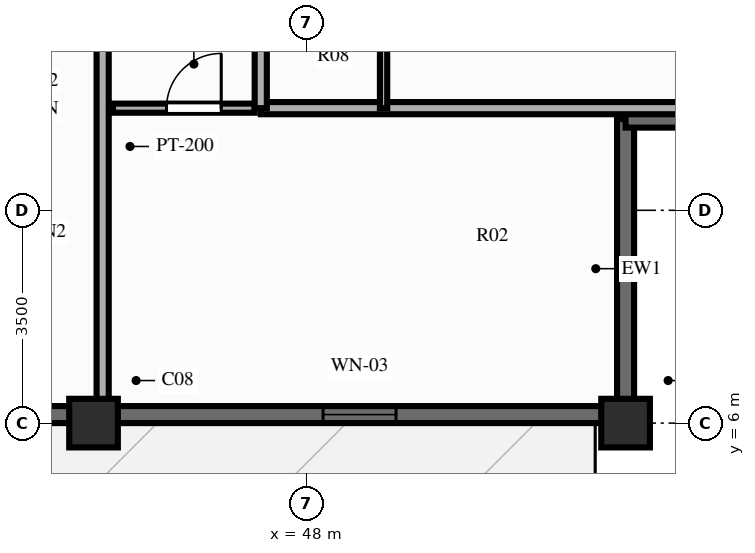
"""IFC4 building model, lengths in metres.
Left out: names, types, materials, properties, quantities, classifications, styles, units other than length and angle.
Written with IfcOpenShell. Run it as: python <this file> out.ifc"""

import sys

from ifc_helpers import new_model, si_unit, direction, frame, frame_2d, origin, origin_2d, place, context, subcontext, project, spatial, rectangle, extrude, source, transform, mapped, element, fill, save


model = new_model("IFC4")
c1 = context("Model", 3, precision=1e-05, world=origin(), true_north=direction((0.0, 1.0)))
c2 = subcontext(c1, "Body", "Model", "MODEL_VIEW")
j1 = project(units=[si_unit("LENGTHUNIT", "METRE"), si_unit("PLANEANGLEUNIT", "RADIAN")], contexts=[c1])
p1 = place(None, origin())
s1 = spatial("IfcSite", under=j1, at=p1, CompositionType="ELEMENT")
p2 = place(p1, origin())
s2 = spatial("IfcBuilding", under=s1, at=p2, CompositionType="ELEMENT")
p3 = place(p2, frame((0.0, 0.0, 179.8)))
s3 = spatial("IfcBuildingStorey", under=s2, at=p3, CompositionType="ELEMENT", Elevation=179.8)
m1 = source(origin(), c2, "Body", "SweptSolid", [
    extrude(rectangle(XDim=0.8, YDim=0.8, at=origin_2d()), origin(), (0.0, 0.0, 1.0), 3.0),
])
for number, where, z_axis, x_axis in (
    (1, (44.5, 6.0, 0.0), (0.0, 0.0, 1.0), (1.0, 0.0, 0.0)),
    (2, (53.25, 6.0, 0.0), (0.0, 0.0, 1.0), (1.0, 0.0, 0.0)),
):
    element("IfcColumn", number, at=place(p3, frame(where, z_axis=z_axis, x_axis=x_axis)), inside=s3, PredefinedType="COLUMN", context=c2, shape_type="MappedRepresentation", body=[
        mapped(m1, transform((0.0, 0.0, 0.0), scale=1.0)),
    ])
p4 = place(p3, frame((22.75, 6.14, 0.0), z_axis=(0.0, 0.0, 1.0), x_axis=(1.0, 0.0, 0.0)))
e3 = element("IfcWall", 3, at=p4, inside=s3, PredefinedType="SOLIDWALL", context=c2, shape_type="SweptSolid", body=[
    extrude(rectangle(XDim=30.5, YDim=0.28, at=frame_2d((15.25, 0.0))), origin(), (0.0, 0.0, 1.0), 2.28),
])
p5 = place(p4, frame((4.925, 0.0, 0.0), z_axis=(0.0, 0.0, 1.0), x_axis=(-1.0, 0.0, 0.0)))
e4 = element("IfcOpeningElement", 4, at=p5, cuts=e3, PredefinedType="OPENING", context=c2, shape_type="SweptSolid", body=[
    extrude(rectangle(XDim=1.1, YDim=2.15, at=frame_2d((0.55, 1.075))), frame((0.0, 0.152, 0.0), z_axis=(0.0, -1.0, 0.0), x_axis=(1.0, 0.0, 0.0)), (0.0, 0.0, 1.0), 0.304),
])
p6 = place(p4, frame((9.42, 0.0, 0.25)))
e5 = element("IfcOpeningElement", 5, at=p6, cuts=e3, PredefinedType="OPENING", context=c2, shape_type="SweptSolid", body=[
    extrude(rectangle(XDim=0.95, YDim=1.5, at=frame_2d((0.475, 0.75))), frame((0.0, 0.152, 0.0), z_axis=(0.0, -1.0, 0.0), x_axis=(1.0, 0.0, 0.0)), (0.0, 0.0, 1.0), 0.304),
])
p7 = place(p4, frame((11.244, 0.0, 0.25)))
e6 = element("IfcOpeningElement", 6, at=p7, cuts=e3, PredefinedType="OPENING", context=c2, shape_type="SweptSolid", body=[
    extrude(rectangle(XDim=1.2, YDim=1.5, at=frame_2d((0.6, 0.75))), frame((0.0, 0.152, 0.0), z_axis=(0.0, -1.0, 0.0), x_axis=(1.0, 0.0, 0.0)), (0.0, 0.0, 1.0), 0.304),
])
p8 = place(p4, frame((13.602, 0.0, 0.25)))
e7 = element("IfcOpeningElement", 7, at=p8, cuts=e3, PredefinedType="OPENING", context=c2, shape_type="SweptSolid", body=[
    extrude(rectangle(XDim=1.2, YDim=1.5, at=frame_2d((0.6, 0.75))), frame((0.0, 0.152, 0.0), z_axis=(0.0, -1.0, 0.0), x_axis=(1.0, 0.0, 0.0)), (0.0, 0.0, 1.0), 0.304),
])
p9 = place(p4, frame((16.683, 0.0, 0.25)))
e8 = element("IfcOpeningElement", 8, at=p9, cuts=e3, PredefinedType="OPENING", context=c2, shape_type="SweptSolid", body=[
    extrude(rectangle(XDim=1.2, YDim=1.5, at=frame_2d((0.6, 0.75))), frame((0.0, 0.152, 0.0), z_axis=(0.0, -1.0, 0.0), x_axis=(1.0, 0.0, 0.0)), (0.0, 0.0, 1.0), 0.304),
])
p10 = place(p4, frame((19.68, 0.0, 0.25)))
e9 = element("IfcOpeningElement", 9, at=p10, cuts=e3, PredefinedType="OPENING", context=c2, shape_type="SweptSolid", body=[
    extrude(rectangle(XDim=1.2, YDim=1.5, at=frame_2d((0.6, 0.75))), frame((0.0, 0.152, 0.0), z_axis=(0.0, -1.0, 0.0), x_axis=(1.0, 0.0, 0.0)), (0.0, 0.0, 1.0), 0.304),
])
p11 = place(p4, frame((25.525, 0.0, 0.25)))
e10 = element("IfcOpeningElement", 10, at=p11, cuts=e3, PredefinedType="OPENING", context=c2, shape_type="SweptSolid", body=[
    extrude(rectangle(XDim=1.2, YDim=1.5, at=frame_2d((0.6, 0.75))), frame((0.0, 0.152, 0.0), z_axis=(0.0, -1.0, 0.0), x_axis=(1.0, 0.0, 0.0)), (0.0, 0.0, 1.0), 0.304),
])
for number, where, z_axis, x_axis in (
    (11, (53.25, 6.08, 0.0), (0.0, 0.0, 1.0), (0.0, 1.0, 0.0)),
    (12, (53.25, 11.0, 0.0), (0.0, 0.0, 1.0), (1.0, 0.0, 0.0)),
):
    element("IfcWall", number, at=place(p3, frame(where, z_axis=z_axis, x_axis=x_axis)), inside=s3, PredefinedType="SOLIDWALL", context=c2, shape_type="SweptSolid", body=[
        extrude(rectangle(XDim=4.92, YDim=0.28, at=frame_2d((2.46, 0.0))), origin(), (0.0, 0.0, 1.0), 2.28),
    ])
p12 = place(p3, frame((44.82, 11.18, 0.0), z_axis=(0.0, 0.0, 1.0), x_axis=(1.0, 0.0, 0.0)))
e13 = element("IfcWall", 13, at=p12, inside=s3, PredefinedType="PARTITIONING", context=c2, shape_type="SweptSolid", body=[
    extrude(rectangle(XDim=2.33, YDim=0.15, at=frame_2d((1.165, 0.0))), origin(), (0.0, 0.0, 1.0), 2.79),
])
p13 = place(p12, frame((0.88, 0.0, 0.0)))
e14 = element("IfcOpeningElement", 14, at=p13, cuts=e13, PredefinedType="OPENING", context=c2, shape_type="SweptSolid", body=[
    extrude(rectangle(XDim=0.9, YDim=2.1, at=frame_2d((0.45, 1.05))), frame((0.0, 0.087, 0.0), z_axis=(0.0, -1.0, 0.0), x_axis=(1.0, 0.0, 0.0)), (0.0, 0.0, 1.0), 0.174),
])
p14 = place(p3, frame((44.65, 14.95, 0.0), z_axis=(0.0, 0.0, 1.0), x_axis=(0.0, -1.0, 0.0)))
e15 = element("IfcWall", 15, at=p14, inside=s3, PredefinedType="PARTITIONING", context=c2, shape_type="SweptSolid", body=[
    extrude(rectangle(XDim=8.8, YDim=0.2, at=frame_2d((4.4, 0.0))), origin(), (0.0, 0.0, 1.0), 2.39),
])
p15 = place(p3, frame((47.25, 11.18, 0.0), z_axis=(0.0, 0.0, 1.0), x_axis=(1.0, 0.0, 0.0)))
e16 = element("IfcWall", 16, at=p15, inside=s3, PredefinedType="PARTITIONING", context=c2, shape_type="SweptSolid", body=[
    extrude(rectangle(XDim=10.85, YDim=0.2, at=frame_2d((5.425, 0.0))), origin(), (0.0, 0.0, 1.0), 2.79),
])
p16 = place(p3, frame((47.25, 11.18, 0.0), z_axis=(0.0, 0.0, 1.0), x_axis=(0.0, 1.0, 0.0)))
e17 = element("IfcWall", 17, at=p16, inside=s3, PredefinedType="PARTITIONING", context=c2, shape_type="SweptSolid", body=[
    extrude(rectangle(XDim=2.879, YDim=0.2, at=frame_2d((1.439, 0.0))), origin(), (0.0, 0.0, 1.0), 2.79),
])
p17 = place(p3, frame((49.27, 11.18, 0.0), z_axis=(0.0, 0.0, 1.0), x_axis=(0.0, 1.0, 0.0)))
e18 = element("IfcWall", 18, at=p17, inside=s3, PredefinedType="PARTITIONING", context=c2, shape_type="SweptSolid", body=[
    extrude(rectangle(XDim=2.879, YDim=0.12, at=frame_2d((1.439, 0.0))), origin(), (0.0, 0.0, 1.0), 2.79),
])
m2 = source(origin(), c2, "Body", "SweptSolid", [
    extrude(rectangle(XDim=1.2, YDim=1.5, at=frame_2d((0.6, 0.75))), frame((0.0, 0.03, 0.0), z_axis=(0.0, -1.0, 0.0), x_axis=(1.0, 0.0, 0.0)), (0.0, 0.0, 1.0), 0.06),
])
p18 = place(p11, origin())
e19 = element("IfcWindow", 19, at=p18, inside=s3, PartitioningType="SINGLE_PANEL", PredefinedType="WINDOW", context=c2, shape_type="MappedRepresentation", body=[
    mapped(m2, transform((0.0, 0.0, 0.0), scale=1.0)),
])
fill(e10, e19)
m3 = source(origin(), c2, "Body", "SweptSolid", [
    extrude(rectangle(XDim=0.9, YDim=2.1, at=frame_2d((0.45, 1.05))), frame((0.0, 0.025, 0.0), z_axis=(0.0, -1.0, 0.0), x_axis=(1.0, 0.0, 0.0)), (0.0, 0.0, 1.0), 0.05),
])
p19 = place(p13, origin())
e20 = element("IfcDoor", 20, at=p19, inside=s3, OperationType="SINGLE_SWING_RIGHT", PredefinedType="DOOR", context=c2, shape_type="MappedRepresentation", body=[
    mapped(m3, transform((0.0, 0.0, 0.0), scale=1.0)),
])
fill(e14, e20)
save(model, sys.argv[1])
